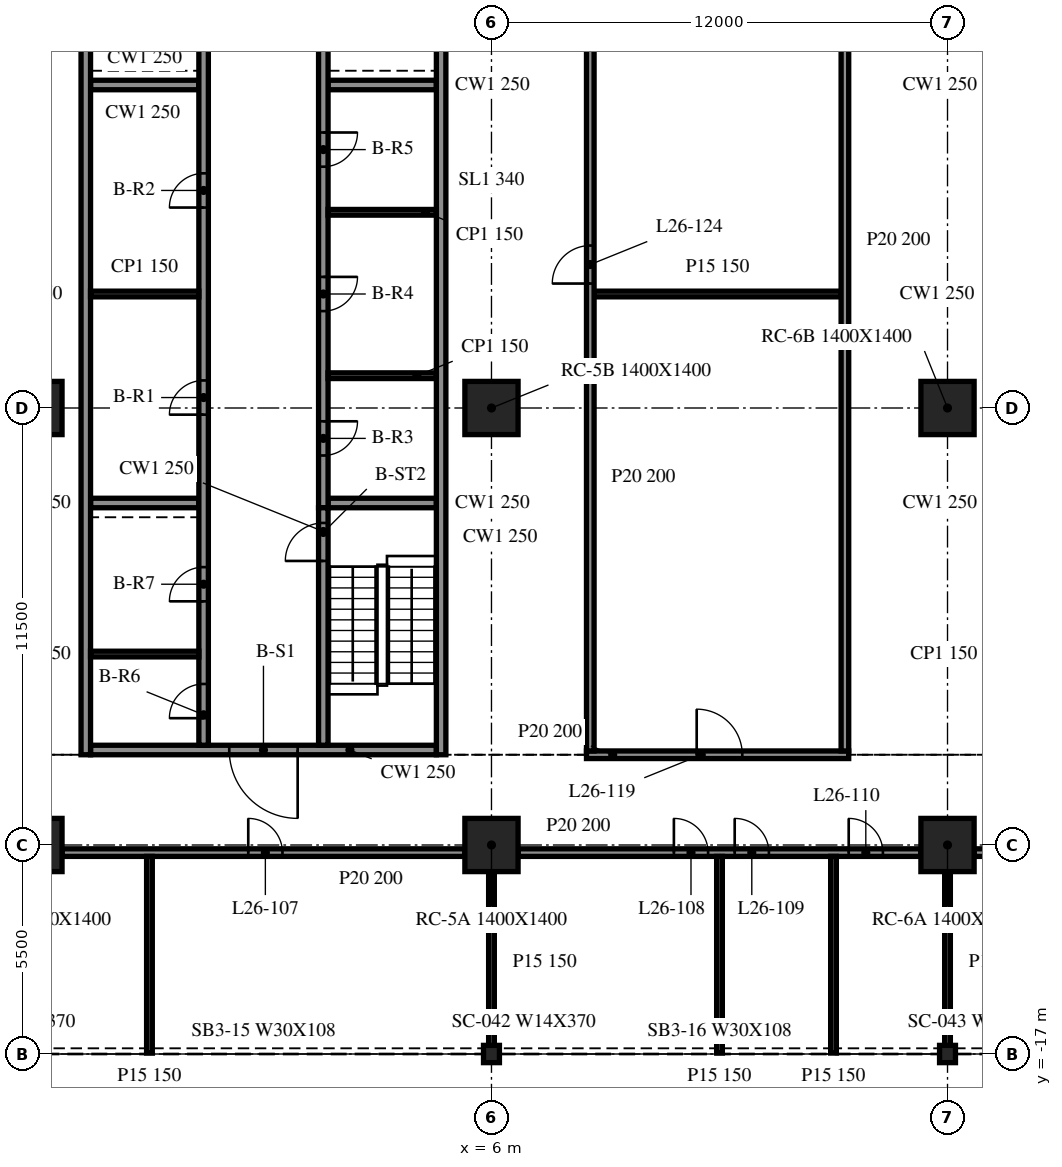
"""IFC4 building model, lengths in metres.
Left out: names, types, materials, properties, quantities, classifications, styles, units other than length and angle.
Written with IfcOpenShell. Run it as: python <this file> out.ifc"""

import sys

from ifc_helpers import new_model, si_unit, direction, frame, frame_2d, origin, origin_2d, place, context, subcontext, project, spatial, rectangle, i_section, extrude, element, fill, save


model = new_model("IFC4")
c1 = context("Model", 3, precision=1e-05, world=origin(), true_north=direction((0.0, 1.0)))
c2 = subcontext(c1, "Body", "Model", "MODEL_VIEW")
j1 = project(units=[si_unit("LENGTHUNIT", "METRE"), si_unit("PLANEANGLEUNIT", "RADIAN")], contexts=[c1])
p1 = place(None, origin())
s1 = spatial("IfcSite", under=j1, at=p1, CompositionType="ELEMENT")
p2 = place(p1, origin())
s2 = spatial("IfcBuilding", under=s1, at=p2, CompositionType="ELEMENT")
p3 = place(p2, frame((0.0, 0.0, 113.5)))
s3 = spatial("IfcBuildingStorey", under=s2, at=p3, CompositionType="ELEMENT", Elevation=113.5)
for number, where, z_axis, x_axis in (
    (1, (-6.0, -11.5, -0.34), (0.0, 0.0, 1.0), (1.0, 0.0, 0.0)),
    (2, (-6.0, 0.0, -0.34), (0.0, 0.0, 1.0), (1.0, 0.0, 0.0)),
    (3, (6.0, -11.5, -0.34), (0.0, 0.0, 1.0), (1.0, 0.0, 0.0)),
    (4, (6.0, 0.0, -0.34), (0.0, 0.0, 1.0), (1.0, 0.0, 0.0)),
    (5, (18.0, -11.5, -0.34), (0.0, 0.0, 1.0), (1.0, 0.0, 0.0)),
    (6, (18.0, 0.0, -0.34), (0.0, 0.0, 1.0), (1.0, 0.0, 0.0)),
):
    element("IfcColumn", number, at=place(p3, frame(where, z_axis=z_axis, x_axis=x_axis)), inside=s3, PredefinedType="COLUMN", context=c2, shape_type="SweptSolid", body=[
        extrude(rectangle(XDim=1.4, YDim=1.4, at=origin_2d()), origin(), (0.0, 0.0, 1.0), 3.89),
    ])
for number, where, z_axis, x_axis in (
    (7, (6.0, -17.0, -0.34), (0.0, 0.0, 1.0), (1.0, 0.0, 0.0)),
    (8, (18.0, -17.0, -0.34), (0.0, 0.0, 1.0), (1.0, 0.0, 0.0)),
):
    element("IfcColumn", number, at=place(p3, frame(where, z_axis=z_axis, x_axis=x_axis)), inside=s3, PredefinedType="COLUMN", context=c2, shape_type="SweptSolid", body=[
        extrude(i_section(OverallWidth=0.419, OverallDepth=0.455, WebThickness=0.042, FlangeThickness=0.068, at=origin_2d()), origin(), (0.0, 0.0, 1.0), 3.89),
    ])
for number, where, z_axis, x_axis in (
    (9, (-4.675, 15.125, 0.0), (0.0, 0.0, 1.0), (0.0, -1.0, 0.0)),
    (10, (4.675, -9.125, 0.0), (0.0, 0.0, 1.0), (0.0, 1.0, 0.0)),
):
    element("IfcWall", number, at=place(p3, frame(where, z_axis=z_axis, x_axis=x_axis)), inside=s3, PredefinedType="SOLIDWALL", context=c2, shape_type="SweptSolid", body=[
        extrude(rectangle(XDim=24.25, YDim=0.25, at=frame_2d((12.125, 0.0))), origin(), (0.0, 0.0, 1.0), 3.55),
    ])
p4 = place(p3, frame((4.55, -9.0, 0.0), z_axis=(0.0, 0.0, 1.0), x_axis=(-1.0, 0.0, 0.0)))
e11 = element("IfcWall", 11, at=p4, inside=s3, PredefinedType="SOLIDWALL", context=c2, shape_type="SweptSolid", body=[
    extrude(rectangle(XDim=9.1, YDim=0.25, at=frame_2d((4.55, 0.0))), origin(), (0.0, 0.0, 1.0), 3.55),
])
p5 = place(p4, frame((3.65, 0.0, 0.0)))
e12 = element("IfcOpeningElement", 12, at=p5, cuts=e11, PredefinedType="OPENING", context=c2, shape_type="SweptSolid", body=[
    extrude(rectangle(XDim=1.8, YDim=2.1, at=frame_2d((0.9, 1.05))), frame((0.0, 0.135, 0.0), z_axis=(0.0, -1.0, 0.0), x_axis=(1.0, 0.0, 0.0)), (0.0, 0.0, 1.0), 0.27),
])
p6 = place(p3, frame((-1.575, -8.875, 0.0), z_axis=(0.0, 0.0, 1.0), x_axis=(0.0, 1.0, 0.0)))
e13 = element("IfcWall", 13, at=p6, inside=s3, PredefinedType="SOLIDWALL", context=c2, shape_type="SweptSolid", body=[
    extrude(rectangle(XDim=23.75, YDim=0.25, at=frame_2d((11.875, 0.0))), origin(), (0.0, 0.0, 1.0), 3.55),
])
p7 = place(p6, frame((8.7, 0.0, 0.0)))
e14 = element("IfcOpeningElement", 14, at=p7, cuts=e13, PredefinedType="OPENING", context=c2, shape_type="SweptSolid", body=[
    extrude(rectangle(XDim=0.9, YDim=2.1, at=frame_2d((0.45, 1.05))), frame((0.0, 0.135, 0.0), z_axis=(0.0, -1.0, 0.0), x_axis=(1.0, 0.0, 0.0)), (0.0, 0.0, 1.0), 0.27),
])
p8 = place(p6, frame((14.15, 0.0, 0.0)))
e15 = element("IfcOpeningElement", 15, at=p8, cuts=e13, PredefinedType="OPENING", context=c2, shape_type="SweptSolid", body=[
    extrude(rectangle(XDim=0.9, YDim=2.1, at=frame_2d((0.45, 1.05))), frame((0.0, 0.135, 0.0), z_axis=(0.0, -1.0, 0.0), x_axis=(1.0, 0.0, 0.0)), (0.0, 0.0, 1.0), 0.27),
])
p9 = place(p6, frame((0.712, 0.0, 0.0)))
e16 = element("IfcOpeningElement", 16, at=p9, cuts=e13, PredefinedType="OPENING", context=c2, shape_type="SweptSolid", body=[
    extrude(rectangle(XDim=0.9, YDim=2.1, at=frame_2d((0.45, 1.05))), frame((0.0, 0.135, 0.0), z_axis=(0.0, -1.0, 0.0), x_axis=(1.0, 0.0, 0.0)), (0.0, 0.0, 1.0), 0.27),
])
p10 = place(p6, frame((3.788, 0.0, 0.0)))
e17 = element("IfcOpeningElement", 17, at=p10, cuts=e13, PredefinedType="OPENING", context=c2, shape_type="SweptSolid", body=[
    extrude(rectangle(XDim=0.9, YDim=2.1, at=frame_2d((0.45, 1.05))), frame((0.0, 0.135, 0.0), z_axis=(0.0, -1.0, 0.0), x_axis=(1.0, 0.0, 0.0)), (0.0, 0.0, 1.0), 0.27),
])
p11 = place(p6, frame((20.3, 0.0, 0.0)))
e18 = element("IfcOpeningElement", 18, at=p11, cuts=e13, PredefinedType="OPENING", context=c2, shape_type="SweptSolid", body=[
    extrude(rectangle(XDim=0.9, YDim=2.1, at=frame_2d((0.45, 1.05))), frame((0.0, 0.135, 0.0), z_axis=(0.0, -1.0, 0.0), x_axis=(1.0, 0.0, 0.0)), (0.0, 0.0, 1.0), 0.27),
])
p12 = place(p3, frame((1.575, -8.875, 0.0), z_axis=(0.0, 0.0, 1.0), x_axis=(0.0, 1.0, 0.0)))
e19 = element("IfcWall", 19, at=p12, inside=s3, PredefinedType="SOLIDWALL", context=c2, shape_type="SweptSolid", body=[
    extrude(rectangle(XDim=6.25, YDim=0.25, at=frame_2d((3.125, 0.0))), origin(), (0.0, 0.0, 1.0), 3.55),
])
p13 = place(p12, frame((4.85, 0.0, 0.0)))
e20 = element("IfcOpeningElement", 20, at=p13, cuts=e19, PredefinedType="OPENING", context=c2, shape_type="SweptSolid", body=[
    extrude(rectangle(XDim=1.0, YDim=2.1, at=frame_2d((0.5, 1.05))), frame((0.0, 0.135, 0.0), z_axis=(0.0, -1.0, 0.0), x_axis=(1.0, 0.0, 0.0)), (0.0, 0.0, 1.0), 0.27),
])
p14 = place(p3, frame((1.575, 14.875, 0.0), z_axis=(0.0, 0.0, 1.0), x_axis=(0.0, -1.0, 0.0)))
e21 = element("IfcWall", 21, at=p14, inside=s3, PredefinedType="SOLIDWALL", context=c2, shape_type="SweptSolid", body=[
    extrude(rectangle(XDim=17.5, YDim=0.25, at=frame_2d((8.75, 0.0))), origin(), (0.0, 0.0, 1.0), 3.55),
])
p15 = place(p14, frame((15.225, 0.0, 0.0)))
e22 = element("IfcOpeningElement", 22, at=p15, cuts=e21, PredefinedType="OPENING", context=c2, shape_type="SweptSolid", body=[
    extrude(rectangle(XDim=0.9, YDim=2.1, at=frame_2d((0.45, 1.05))), frame((0.0, 0.135, 0.0), z_axis=(0.0, -1.0, 0.0), x_axis=(1.0, 0.0, 0.0)), (0.0, 0.0, 1.0), 0.27),
])
p16 = place(p14, frame((11.425, 0.0, 0.0)))
e23 = element("IfcOpeningElement", 23, at=p16, cuts=e21, PredefinedType="OPENING", context=c2, shape_type="SweptSolid", body=[
    extrude(rectangle(XDim=0.9, YDim=2.1, at=frame_2d((0.45, 1.05))), frame((0.0, 0.135, 0.0), z_axis=(0.0, -1.0, 0.0), x_axis=(1.0, 0.0, 0.0)), (0.0, 0.0, 1.0), 0.27),
])
p17 = place(p14, frame((7.625, 0.0, 0.0)))
e24 = element("IfcOpeningElement", 24, at=p17, cuts=e21, PredefinedType="OPENING", context=c2, shape_type="SweptSolid", body=[
    extrude(rectangle(XDim=0.9, YDim=2.1, at=frame_2d((0.45, 1.05))), frame((0.0, 0.135, 0.0), z_axis=(0.0, -1.0, 0.0), x_axis=(1.0, 0.0, 0.0)), (0.0, 0.0, 1.0), 0.27),
])
p18 = place(p14, frame((4.087, 0.0, 0.0)))
e25 = element("IfcOpeningElement", 25, at=p18, cuts=e21, PredefinedType="OPENING", context=c2, shape_type="SweptSolid", body=[
    extrude(rectangle(XDim=0.9, YDim=2.1, at=frame_2d((0.45, 1.05))), frame((0.0, 0.135, 0.0), z_axis=(0.0, -1.0, 0.0), x_axis=(1.0, 0.0, 0.0)), (0.0, 0.0, 1.0), 0.27),
])
p19 = place(p14, frame((1.012, 0.0, 0.0)))
e26 = element("IfcOpeningElement", 26, at=p19, cuts=e21, PredefinedType="OPENING", context=c2, shape_type="SweptSolid", body=[
    extrude(rectangle(XDim=0.9, YDim=2.1, at=frame_2d((0.45, 1.05))), frame((0.0, 0.135, 0.0), z_axis=(0.0, -1.0, 0.0), x_axis=(1.0, 0.0, 0.0)), (0.0, 0.0, 1.0), 0.27),
])
for number, where, z_axis, x_axis in (
    (27, (-4.55, -2.5, 0.0), (0.0, 0.0, 1.0), (1.0, 0.0, 0.0)),
    (28, (-4.55, 8.5, 0.0), (0.0, 0.0, 1.0), (1.0, 0.0, 0.0)),
    (29, (1.7, -2.5, 0.0), (0.0, 0.0, 1.0), (1.0, 0.0, 0.0)),
    (30, (1.7, 8.5, 0.0), (0.0, 0.0, 1.0), (1.0, 0.0, 0.0)),
):
    element("IfcWall", number, at=place(p3, frame(where, z_axis=z_axis, x_axis=x_axis)), inside=s3, PredefinedType="SOLIDWALL", context=c2, shape_type="SweptSolid", body=[
        extrude(rectangle(XDim=2.85, YDim=0.25, at=frame_2d((1.425, 0.0))), origin(), (0.0, 0.0, 1.0), 3.55),
    ])
for number, where, z_axis, x_axis in (
    (31, (-4.55, 3.0, 0.0), (0.0, 0.0, 1.0), (1.0, 0.0, 0.0)),
    (32, (1.7, 0.85, 0.0), (0.0, 0.0, 1.0), (1.0, 0.0, 0.0)),
    (33, (1.7, 5.15, 0.0), (0.0, 0.0, 1.0), (1.0, 0.0, 0.0)),
    (34, (-4.55, -6.475, 0.0), (0.0, 0.0, 1.0), (1.0, 0.0, 0.0)),
):
    element("IfcWall", number, at=place(p3, frame(where, z_axis=z_axis, x_axis=x_axis)), inside=s3, PredefinedType="PARTITIONING", context=c2, shape_type="SweptSolid", body=[
        extrude(rectangle(XDim=2.85, YDim=0.15, at=frame_2d((1.425, 0.0))), origin(), (0.0, 0.0, 1.0), 3.55),
    ])
p20 = place(p3, frame((-5.3, -11.7, 0.0), z_axis=(0.0, 0.0, 1.0), x_axis=(1.0, 0.0, 0.0)))
e35 = element("IfcWall", 35, at=p20, inside=s3, PredefinedType="PARTITIONING", context=c2, shape_type="SweptSolid", body=[
    extrude(rectangle(XDim=10.6, YDim=0.2, at=frame_2d((5.3, 0.0))), origin(), (0.0, 0.0, 1.0), 3.55),
])
p21 = place(p20, frame((4.9, 0.0, 0.0)))
e36 = element("IfcOpeningElement", 36, at=p21, cuts=e35, PredefinedType="OPENING", context=c2, shape_type="SweptSolid", body=[
    extrude(rectangle(XDim=0.9, YDim=2.1, at=frame_2d((0.45, 1.05))), frame((0.0, 0.11, 0.0), z_axis=(0.0, -1.0, 0.0), x_axis=(1.0, 0.0, 0.0)), (0.0, 0.0, 1.0), 0.22),
])
p22 = place(p3, frame((6.7, -11.7, 0.0), z_axis=(0.0, 0.0, 1.0), x_axis=(1.0, 0.0, 0.0)))
e37 = element("IfcWall", 37, at=p22, inside=s3, PredefinedType="PARTITIONING", context=c2, shape_type="SweptSolid", body=[
    extrude(rectangle(XDim=10.6, YDim=0.2, at=frame_2d((5.3, 0.0))), origin(), (0.0, 0.0, 1.0), 3.55),
])
p23 = place(p22, frame((4.1, 0.0, 0.0)))
e38 = element("IfcOpeningElement", 38, at=p23, cuts=e37, PredefinedType="OPENING", context=c2, shape_type="SweptSolid", body=[
    extrude(rectangle(XDim=0.9, YDim=2.1, at=frame_2d((0.45, 1.05))), frame((0.0, 0.11, 0.0), z_axis=(0.0, -1.0, 0.0), x_axis=(1.0, 0.0, 0.0)), (0.0, 0.0, 1.0), 0.22),
])
p24 = place(p22, frame((5.7, 0.0, 0.0)))
e39 = element("IfcOpeningElement", 39, at=p24, cuts=e37, PredefinedType="OPENING", context=c2, shape_type="SweptSolid", body=[
    extrude(rectangle(XDim=0.9, YDim=2.1, at=frame_2d((0.45, 1.05))), frame((0.0, 0.11, 0.0), z_axis=(0.0, -1.0, 0.0), x_axis=(1.0, 0.0, 0.0)), (0.0, 0.0, 1.0), 0.22),
])
p25 = place(p22, frame((8.7, 0.0, 0.0)))
e40 = element("IfcOpeningElement", 40, at=p25, cuts=e37, PredefinedType="OPENING", context=c2, shape_type="SweptSolid", body=[
    extrude(rectangle(XDim=0.9, YDim=2.1, at=frame_2d((0.45, 1.05))), frame((0.0, 0.11, 0.0), z_axis=(0.0, -1.0, 0.0), x_axis=(1.0, 0.0, 0.0)), (0.0, 0.0, 1.0), 0.22),
])
p26 = place(p3, frame((18.7, -11.7, 0.0), z_axis=(0.0, 0.0, 1.0), x_axis=(1.0, 0.0, 0.0)))
e41 = element("IfcWall", 41, at=p26, inside=s3, PredefinedType="PARTITIONING", context=c2, shape_type="SweptSolid", body=[
    extrude(rectangle(XDim=10.6, YDim=0.2, at=frame_2d((5.3, 0.0))), origin(), (0.0, 0.0, 1.0), 3.55),
])
p27 = place(p26, frame((4.9, 0.0, 0.0)))
e42 = element("IfcOpeningElement", 42, at=p27, cuts=e41, PredefinedType="OPENING", context=c2, shape_type="SweptSolid", body=[
    extrude(rectangle(XDim=0.9, YDim=2.1, at=frame_2d((0.45, 1.05))), frame((0.0, 0.11, 0.0), z_axis=(0.0, -1.0, 0.0), x_axis=(1.0, 0.0, 0.0)), (0.0, 0.0, 1.0), 0.22),
])
p28 = place(p3, frame((8.5, -9.125, 0.0), z_axis=(0.0, 0.0, 1.0), x_axis=(1.0, 0.0, 0.0)))
e43 = element("IfcWall", 43, at=p28, inside=s3, PredefinedType="PARTITIONING", context=c2, shape_type="SweptSolid", body=[
    extrude(rectangle(XDim=6.9, YDim=0.2, at=frame_2d((3.45, 0.0))), origin(), (0.0, 0.0, 1.0), 3.55),
])
p29 = place(p28, frame((2.9, 0.0, 0.0)))
e44 = element("IfcOpeningElement", 44, at=p29, cuts=e43, PredefinedType="OPENING", context=c2, shape_type="SweptSolid", body=[
    extrude(rectangle(XDim=1.2, YDim=2.1, at=frame_2d((0.6, 1.05))), frame((0.0, 0.11, 0.0), z_axis=(0.0, -1.0, 0.0), x_axis=(1.0, 0.0, 0.0)), (0.0, 0.0, 1.0), 0.22),
])
p30 = place(p3, frame((8.7, 3.0, 0.0), z_axis=(0.0, 0.0, 1.0), x_axis=(1.0, 0.0, 0.0)))
e45 = element("IfcWall", 45, at=p30, inside=s3, PredefinedType="PARTITIONING", context=c2, shape_type="SweptSolid", body=[
    extrude(rectangle(XDim=6.5, YDim=0.15, at=frame_2d((3.25, 0.0))), origin(), (0.0, 0.0, 1.0), 3.55),
])
p31 = place(p3, frame((-3.0, -16.975, 0.0), z_axis=(0.0, 0.0, 1.0), x_axis=(0.0, 1.0, 0.0)))
e46 = element("IfcWall", 46, at=p31, inside=s3, PredefinedType="PARTITIONING", context=c2, shape_type="SweptSolid", body=[
    extrude(rectangle(XDim=5.175, YDim=0.15, at=frame_2d((2.587, 0.0))), origin(), (0.0, 0.0, 1.0), 3.55),
])
p32 = place(p3, frame((6.0, -16.975, 0.0), z_axis=(0.0, 0.0, 1.0), x_axis=(0.0, 1.0, 0.0)))
e47 = element("IfcWall", 47, at=p32, inside=s3, PredefinedType="PARTITIONING", context=c2, shape_type="SweptSolid", body=[
    extrude(rectangle(XDim=4.775, YDim=0.15, at=frame_2d((2.388, 0.0))), origin(), (0.0, 0.0, 1.0), 3.55),
])
p33 = place(p3, frame((8.6, -9.025, 0.0), z_axis=(0.0, 0.0, 1.0), x_axis=(0.0, 1.0, 0.0)))
e48 = element("IfcWall", 48, at=p33, inside=s3, PredefinedType="PARTITIONING", context=c2, shape_type="SweptSolid", body=[
    extrude(rectangle(XDim=24.05, YDim=0.2, at=frame_2d((12.025, 0.0))), origin(), (0.0, 0.0, 1.0), 3.55),
])
p34 = place(p33, frame((12.3, 0.0, 0.0)))
e49 = element("IfcOpeningElement", 49, at=p34, cuts=e48, PredefinedType="OPENING", context=c2, shape_type="SweptSolid", body=[
    extrude(rectangle(XDim=1.0, YDim=2.1, at=frame_2d((0.5, 1.05))), frame((0.0, 0.11, 0.0), z_axis=(0.0, -1.0, 0.0), x_axis=(1.0, 0.0, 0.0)), (0.0, 0.0, 1.0), 0.22),
])
for number, where, z_axis, x_axis in (
    (50, (12.0, -16.975, 0.0), (0.0, 0.0, 1.0), (0.0, 1.0, 0.0)),
    (51, (15.0, -16.975, 0.0), (0.0, 0.0, 1.0), (0.0, 1.0, 0.0)),
):
    element("IfcWall", number, at=place(p3, frame(where, z_axis=z_axis, x_axis=x_axis)), inside=s3, PredefinedType="PARTITIONING", context=c2, shape_type="SweptSolid", body=[
        extrude(rectangle(XDim=5.175, YDim=0.15, at=frame_2d((2.587, 0.0))), origin(), (0.0, 0.0, 1.0), 3.55),
    ])
p35 = place(p3, frame((15.3, -9.025, 0.0), z_axis=(0.0, 0.0, 1.0), x_axis=(0.0, 1.0, 0.0)))
e52 = element("IfcWall", 52, at=p35, inside=s3, PredefinedType="PARTITIONING", context=c2, shape_type="SweptSolid", body=[
    extrude(rectangle(XDim=24.05, YDim=0.2, at=frame_2d((12.025, 0.0))), origin(), (0.0, 0.0, 1.0), 3.55),
])
p36 = place(p3, frame((18.0, -16.975, 0.0), z_axis=(0.0, 0.0, 1.0), x_axis=(0.0, 1.0, 0.0)))
e53 = element("IfcWall", 53, at=p36, inside=s3, PredefinedType="PARTITIONING", context=c2, shape_type="SweptSolid", body=[
    extrude(rectangle(XDim=4.775, YDim=0.15, at=frame_2d((2.388, 0.0))), origin(), (0.0, 0.0, 1.0), 3.55),
])
p37 = place(p5, origin())
e54 = element("IfcDoor", 54, at=p37, inside=s3, OperationType="DOUBLE_DOOR_SINGLE_SWING", PredefinedType="DOOR", context=c2, shape_type="SweptSolid", body=[
    extrude(rectangle(XDim=1.8, YDim=2.1, at=frame_2d((0.9, 1.05))), frame((0.0, 0.025, 0.0), z_axis=(0.0, -1.0, 0.0), x_axis=(1.0, 0.0, 0.0)), (0.0, 0.0, 1.0), 0.05),
])
fill(e12, e54)
p38 = place(p7, origin())
e55 = element("IfcDoor", 55, at=p38, inside=s3, OperationType="SINGLE_SWING_LEFT", PredefinedType="DOOR", context=c2, shape_type="SweptSolid", body=[
    extrude(rectangle(XDim=0.9, YDim=2.1, at=frame_2d((0.45, 1.05))), frame((0.0, 0.025, 0.0), z_axis=(0.0, -1.0, 0.0), x_axis=(1.0, 0.0, 0.0)), (0.0, 0.0, 1.0), 0.05),
])
fill(e14, e55)
p39 = place(p8, origin())
e56 = element("IfcDoor", 56, at=p39, inside=s3, OperationType="SINGLE_SWING_RIGHT", PredefinedType="DOOR", context=c2, shape_type="SweptSolid", body=[
    extrude(rectangle(XDim=0.9, YDim=2.1, at=frame_2d((0.45, 1.05))), frame((0.0, 0.025, 0.0), z_axis=(0.0, -1.0, 0.0), x_axis=(1.0, 0.0, 0.0)), (0.0, 0.0, 1.0), 0.05),
])
fill(e15, e56)
p40 = place(p15, origin())
e57 = element("IfcDoor", 57, at=p40, inside=s3, OperationType="SINGLE_SWING_LEFT", PredefinedType="DOOR", context=c2, shape_type="SweptSolid", body=[
    extrude(rectangle(XDim=0.9, YDim=2.1, at=frame_2d((0.45, 1.05))), frame((0.0, 0.025, 0.0), z_axis=(0.0, -1.0, 0.0), x_axis=(1.0, 0.0, 0.0)), (0.0, 0.0, 1.0), 0.05),
])
fill(e22, e57)
p41 = place(p16, origin())
e58 = element("IfcDoor", 58, at=p41, inside=s3, OperationType="SINGLE_SWING_RIGHT", PredefinedType="DOOR", context=c2, shape_type="SweptSolid", body=[
    extrude(rectangle(XDim=0.9, YDim=2.1, at=frame_2d((0.45, 1.05))), frame((0.0, 0.025, 0.0), z_axis=(0.0, -1.0, 0.0), x_axis=(1.0, 0.0, 0.0)), (0.0, 0.0, 1.0), 0.05),
])
fill(e23, e58)
p42 = place(p17, origin())
e59 = element("IfcDoor", 59, at=p42, inside=s3, OperationType="SINGLE_SWING_LEFT", PredefinedType="DOOR", context=c2, shape_type="SweptSolid", body=[
    extrude(rectangle(XDim=0.9, YDim=2.1, at=frame_2d((0.45, 1.05))), frame((0.0, 0.025, 0.0), z_axis=(0.0, -1.0, 0.0), x_axis=(1.0, 0.0, 0.0)), (0.0, 0.0, 1.0), 0.05),
])
fill(e24, e59)
p43 = place(p9, origin())
e60 = element("IfcDoor", 60, at=p43, inside=s3, OperationType="SINGLE_SWING_RIGHT", PredefinedType="DOOR", context=c2, shape_type="SweptSolid", body=[
    extrude(rectangle(XDim=0.9, YDim=2.1, at=frame_2d((0.45, 1.05))), frame((0.0, 0.025, 0.0), z_axis=(0.0, -1.0, 0.0), x_axis=(1.0, 0.0, 0.0)), (0.0, 0.0, 1.0), 0.05),
])
fill(e16, e60)
p44 = place(p10, origin())
e61 = element("IfcDoor", 61, at=p44, inside=s3, OperationType="SINGLE_SWING_LEFT", PredefinedType="DOOR", context=c2, shape_type="SweptSolid", body=[
    extrude(rectangle(XDim=0.9, YDim=2.1, at=frame_2d((0.45, 1.05))), frame((0.0, 0.025, 0.0), z_axis=(0.0, -1.0, 0.0), x_axis=(1.0, 0.0, 0.0)), (0.0, 0.0, 1.0), 0.05),
])
fill(e17, e61)
p45 = place(p13, origin())
e62 = element("IfcDoor", 62, at=p45, inside=s3, OperationType="SINGLE_SWING_LEFT", PredefinedType="DOOR", context=c2, shape_type="SweptSolid", body=[
    extrude(rectangle(XDim=1.0, YDim=2.1, at=frame_2d((0.5, 1.05))), frame((0.0, 0.025, 0.0), z_axis=(0.0, -1.0, 0.0), x_axis=(1.0, 0.0, 0.0)), (0.0, 0.0, 1.0), 0.05),
])
fill(e20, e62)
p46 = place(p21, origin())
e63 = element("IfcDoor", 63, at=p46, inside=s3, OperationType="SINGLE_SWING_LEFT", PredefinedType="DOOR", context=c2, shape_type="SweptSolid", body=[
    extrude(rectangle(XDim=0.9, YDim=2.1, at=frame_2d((0.45, 1.05))), frame((0.0, 0.025, 0.0), z_axis=(0.0, -1.0, 0.0), x_axis=(1.0, 0.0, 0.0)), (0.0, 0.0, 1.0), 0.05),
])
fill(e36, e63)
p47 = place(p23, origin())
e64 = element("IfcDoor", 64, at=p47, inside=s3, OperationType="SINGLE_SWING_RIGHT", PredefinedType="DOOR", context=c2, shape_type="SweptSolid", body=[
    extrude(rectangle(XDim=0.9, YDim=2.1, at=frame_2d((0.45, 1.05))), frame((0.0, 0.025, 0.0), z_axis=(0.0, -1.0, 0.0), x_axis=(1.0, 0.0, 0.0)), (0.0, 0.0, 1.0), 0.05),
])
fill(e38, e64)
p48 = place(p24, origin())
e65 = element("IfcDoor", 65, at=p48, inside=s3, OperationType="SINGLE_SWING_LEFT", PredefinedType="DOOR", context=c2, shape_type="SweptSolid", body=[
    extrude(rectangle(XDim=0.9, YDim=2.1, at=frame_2d((0.45, 1.05))), frame((0.0, 0.025, 0.0), z_axis=(0.0, -1.0, 0.0), x_axis=(1.0, 0.0, 0.0)), (0.0, 0.0, 1.0), 0.05),
])
fill(e39, e65)
p49 = place(p25, origin())
e66 = element("IfcDoor", 66, at=p49, inside=s3, OperationType="SINGLE_SWING_LEFT", PredefinedType="DOOR", context=c2, shape_type="SweptSolid", body=[
    extrude(rectangle(XDim=0.9, YDim=2.1, at=frame_2d((0.45, 1.05))), frame((0.0, 0.025, 0.0), z_axis=(0.0, -1.0, 0.0), x_axis=(1.0, 0.0, 0.0)), (0.0, 0.0, 1.0), 0.05),
])
fill(e40, e66)
p50 = place(p29, origin())
e67 = element("IfcDoor", 67, at=p50, inside=s3, OperationType="SINGLE_SWING_RIGHT", PredefinedType="DOOR", context=c2, shape_type="SweptSolid", body=[
    extrude(rectangle(XDim=1.2, YDim=2.1, at=frame_2d((0.6, 1.05))), frame((0.0, 0.025, 0.0), z_axis=(0.0, -1.0, 0.0), x_axis=(1.0, 0.0, 0.0)), (0.0, 0.0, 1.0), 0.05),
])
fill(e44, e67)
p51 = place(p34, origin())
e68 = element("IfcDoor", 68, at=p51, inside=s3, OperationType="SINGLE_SWING_LEFT", PredefinedType="DOOR", context=c2, shape_type="SweptSolid", body=[
    extrude(rectangle(XDim=1.0, YDim=2.1, at=frame_2d((0.5, 1.05))), frame((0.0, 0.025, 0.0), z_axis=(0.0, -1.0, 0.0), x_axis=(1.0, 0.0, 0.0)), (0.0, 0.0, 1.0), 0.05),
])
fill(e49, e68)
save(model, sys.argv[1])
